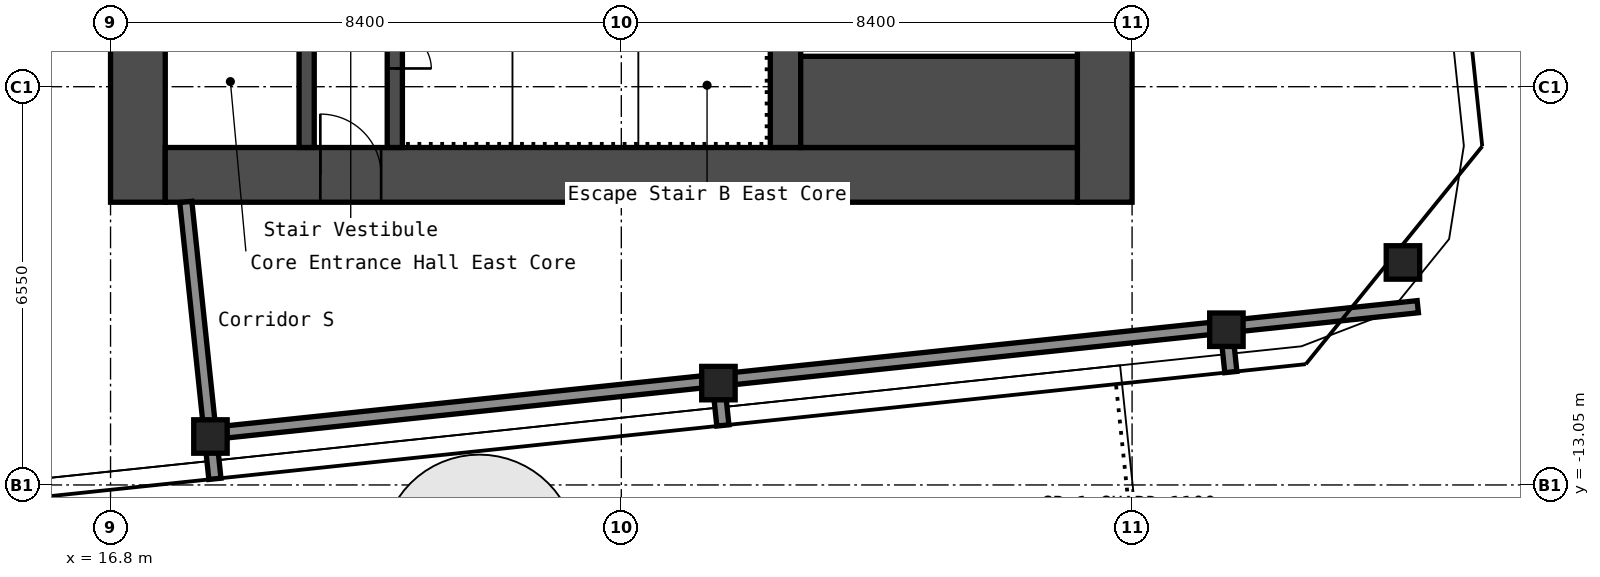
"""IFC4 building model, lengths in metres.
Left out: names, types, materials, properties, quantities, classifications, styles, units other than length and angle.
Written with IfcOpenShell. Run it as: python <this file> out.ifc"""

import sys

from ifc_helpers import new_model, si_unit, direction, frame, frame_2d, origin, origin_2d, place, context, subcontext, project, spatial, rectangle, hollow_rectangle, extrude, element, fill, save


model = new_model("IFC4")
c1 = context("Model", 3, precision=1e-05, world=origin(), true_north=direction((0.0, 1.0)))
c2 = subcontext(c1, "Body", "Model", "MODEL_VIEW")
j1 = project(units=[si_unit("LENGTHUNIT", "METRE"), si_unit("PLANEANGLEUNIT", "RADIAN")], contexts=[c1])
p1 = place(None, origin())
s1 = spatial("IfcSite", under=j1, at=p1, CompositionType="ELEMENT")
p2 = place(p1, origin())
s2 = spatial("IfcBuilding", under=s1, at=p2, CompositionType="ELEMENT")
p3 = place(p2, frame((0.0, 0.0, 245.4)))
s3 = spatial("IfcBuildingStorey", under=s2, at=p3, CompositionType="ELEMENT", Elevation=245.4)
for number, where, z_axis, x_axis in (
    (1, (18.443, -12.253, 0.0), (0.0, 0.0, 1.0), (1.0, 0.0, 0.0)),
    (2, (26.797, -11.375, 0.0), (0.0, 0.0, 1.0), (1.0, 0.0, 0.0)),
    (3, (35.151, -10.497, 0.0), (0.0, 0.0, 1.0), (1.0, 0.0, 0.0)),
    (4, (38.054, -9.39, 0.0), (0.0, 0.0, 1.0), (1.0, 0.0, 0.0)),
):
    element("IfcColumn", number, at=place(p3, frame(where, z_axis=z_axis, x_axis=x_axis)), inside=s3, PredefinedType="COLUMN", context=c2, shape_type="SweptSolid", body=[
        extrude(hollow_rectangle(XDim=0.55, YDim=0.55, WallThickness=0.022, InnerFilletRadius=0.033, OuterFilletRadius=0.055, at=origin_2d()), origin(), (0.0, 0.0, 1.0), 2.75),
    ])
p4 = place(p3, frame((17.25, -8.4, 0.0), z_axis=(0.0, 0.0, 1.0), x_axis=(0.0, 1.0, 0.0)))
e5 = element("IfcWall", 5, at=p4, inside=s3, PredefinedType="SHEAR", context=c2, shape_type="SweptSolid", body=[
    extrude(rectangle(XDim=16.8, YDim=0.9, at=frame_2d((8.4, 0.0))), origin(), (0.0, 0.0, 1.0), 2.75),
])
p5 = place(p4, frame((11.879, 0.0, 0.0)))
e6 = element("IfcOpeningElement", 6, at=p5, cuts=e5, PredefinedType="OPENING", context=c2, shape_type="SweptSolid", body=[
    extrude(rectangle(XDim=1.6, YDim=2.1, at=frame_2d((0.8, 1.05))), frame((0.0, 0.46, 0.0), z_axis=(0.0, -1.0, 0.0), x_axis=(1.0, 0.0, 0.0)), (0.0, 0.0, 1.0), 0.92),
])
p6 = place(p3, frame((33.15, -8.4, 0.0), z_axis=(0.0, 0.0, 1.0), x_axis=(0.0, 1.0, 0.0)))
e7 = element("IfcWall", 7, at=p6, inside=s3, PredefinedType="SHEAR", context=c2, shape_type="SweptSolid", body=[
    extrude(rectangle(XDim=16.8, YDim=0.9, at=frame_2d((8.4, 0.0))), origin(), (0.0, 0.0, 1.0), 2.75),
])
p7 = place(p3, frame((17.7, -7.95, 0.0), z_axis=(0.0, 0.0, 1.0), x_axis=(1.0, 0.0, 0.0)))
e8 = element("IfcWall", 8, at=p7, inside=s3, PredefinedType="SHEAR", context=c2, shape_type="SweptSolid", body=[
    extrude(rectangle(XDim=15.0, YDim=0.9, at=frame_2d((7.5, 0.0))), origin(), (0.0, 0.0, 1.0), 2.75),
])
p8 = place(p7, frame((2.55, 0.0, 0.0)))
e9 = element("IfcOpeningElement", 9, at=p8, cuts=e8, PredefinedType="OPENING", context=c2, shape_type="SweptSolid", body=[
    extrude(rectangle(XDim=1.0, YDim=2.1, at=frame_2d((0.5, 1.05))), frame((0.0, 0.46, 0.0), z_axis=(0.0, -1.0, 0.0), x_axis=(1.0, 0.0, 0.0)), (0.0, 0.0, 1.0), 0.92),
])
p9 = place(p3, frame((20.025, -7.5, 0.0), z_axis=(0.0, 0.0, 1.0), x_axis=(0.0, 1.0, 0.0)))
e10 = element("IfcWall", 10, at=p9, inside=s3, PredefinedType="SHEAR", context=c2, shape_type="SweptSolid", body=[
    extrude(rectangle(XDim=6.3, YDim=0.25, at=frame_2d((3.15, 0.0))), origin(), (0.0, 0.0, 1.0), 2.75),
])
p10 = place(p9, frame((2.4, 0.0, 0.0)))
e11 = element("IfcOpeningElement", 11, at=p10, cuts=e10, PredefinedType="OPENING", context=c2, shape_type="SweptSolid", body=[
    extrude(rectangle(XDim=1.0, YDim=2.1, at=frame_2d((0.5, 1.05))), frame((0.0, 0.135, 0.0), z_axis=(0.0, -1.0, 0.0), x_axis=(1.0, 0.0, 0.0)), (0.0, 0.0, 1.0), 0.27),
])
p11 = place(p3, frame((21.475, -7.5, 0.0), z_axis=(0.0, 0.0, 1.0), x_axis=(0.0, 1.0, 0.0)))
e12 = element("IfcWall", 12, at=p11, inside=s3, PredefinedType="SHEAR", context=c2, shape_type="SweptSolid", body=[
    extrude(rectangle(XDim=3.75, YDim=0.25, at=frame_2d((1.875, 0.0))), origin(), (0.0, 0.0, 1.0), 2.75),
])
p12 = place(p11, frame((1.3, 0.0, 0.0)))
e13 = element("IfcOpeningElement", 13, at=p12, cuts=e12, PredefinedType="OPENING", context=c2, shape_type="SweptSolid", body=[
    extrude(rectangle(XDim=1.2, YDim=2.1, at=frame_2d((0.6, 1.05))), frame((0.0, 0.135, 0.0), z_axis=(0.0, -1.0, 0.0), x_axis=(1.0, 0.0, 0.0)), (0.0, 0.0, 1.0), 0.27),
])
p13 = place(p3, frame((27.9, -7.5, 0.0), z_axis=(0.0, 0.0, 1.0), x_axis=(0.0, 1.0, 0.0)))
e14 = element("IfcWall", 14, at=p13, inside=s3, PredefinedType="SHEAR", context=c2, shape_type="SweptSolid", body=[
    extrude(rectangle(XDim=3.75, YDim=0.5, at=frame_2d((1.875, 0.0))), origin(), (0.0, 0.0, 1.0), 2.75),
])
p14 = place(p3, frame((28.15, -6.75, 0.0), z_axis=(0.0, 0.0, 1.0), x_axis=(1.0, 0.0, 0.0)))
e15 = element("IfcWall", 15, at=p14, inside=s3, PredefinedType="SHEAR", context=c2, shape_type="SweptSolid", body=[
    extrude(rectangle(XDim=4.55, YDim=1.5, at=frame_2d((2.275, 0.0))), origin(), (0.0, 0.0, 1.0), 2.75),
])
p15 = place(p3, frame((18.708, -12.177, 0.0), z_axis=(0.0, 0.0, 1.0), x_axis=(0.994521604238, 0.104531233147, 0.0)))
e16 = element("IfcWall", 16, at=p15, inside=s3, PredefinedType="PARTITIONING", context=c2, shape_type="SweptSolid", body=[
    extrude(rectangle(XDim=19.698, YDim=0.2, at=frame_2d((9.849, 0.0))), origin(), (0.0, 0.0, 1.0), 2.75),
])
p16 = place(p3, frame((18.516, -12.949, 0.0), z_axis=(0.0, 0.0, 1.0), x_axis=(-0.104548796268, 0.994519758074, 0.0)))
e17 = element("IfcWall", 17, at=p16, inside=s3, PredefinedType="PARTITIONING", context=c2, shape_type="SweptSolid", body=[
    extrude(rectangle(XDim=4.579, YDim=0.2, at=frame_2d((2.29, 0.0))), origin(), (0.0, 0.0, 1.0), 2.75),
])
for number, where, z_axis, x_axis in (
    (18, (26.87, -12.071, 0.0), (0.0, 0.0, 1.0), (-0.105, 0.994, 0.0)),
    (19, (35.224, -11.193, 0.0), (0.0, 0.0, 1.0), (-0.105, 0.994, 0.0)),
):
    element("IfcWall", number, at=place(p3, frame(where, z_axis=z_axis, x_axis=x_axis)), inside=s3, PredefinedType="PARTITIONING", context=c2, shape_type="SweptSolid", body=[
        extrude(rectangle(XDim=0.434, YDim=0.2, at=frame_2d((0.217, 0.0))), origin(), (0.0, 0.0, 1.0), 2.75),
    ])
p17 = place(p8, origin())
e20 = element("IfcDoor", 20, at=p17, inside=s3, OperationType="SINGLE_SWING_RIGHT", PredefinedType="DOOR", context=c2, shape_type="SweptSolid", body=[
    extrude(rectangle(XDim=1.0, YDim=2.1, at=frame_2d((0.5, 1.05))), frame((0.0, 0.025, 0.0), z_axis=(0.0, -1.0, 0.0), x_axis=(1.0, 0.0, 0.0)), (0.0, 0.0, 1.0), 0.05),
])
fill(e9, e20)
p18 = place(p12, origin())
e21 = element("IfcDoor", 21, at=p18, inside=s3, OperationType="DOUBLE_DOOR_SINGLE_SWING", PredefinedType="DOOR", context=c2, shape_type="SweptSolid", body=[
    extrude(rectangle(XDim=1.2, YDim=2.1, at=frame_2d((0.6, 1.05))), frame((0.0, 0.025, 0.0), z_axis=(0.0, -1.0, 0.0), x_axis=(1.0, 0.0, 0.0)), (0.0, 0.0, 1.0), 0.05),
])
fill(e13, e21)
save(model, sys.argv[1])
